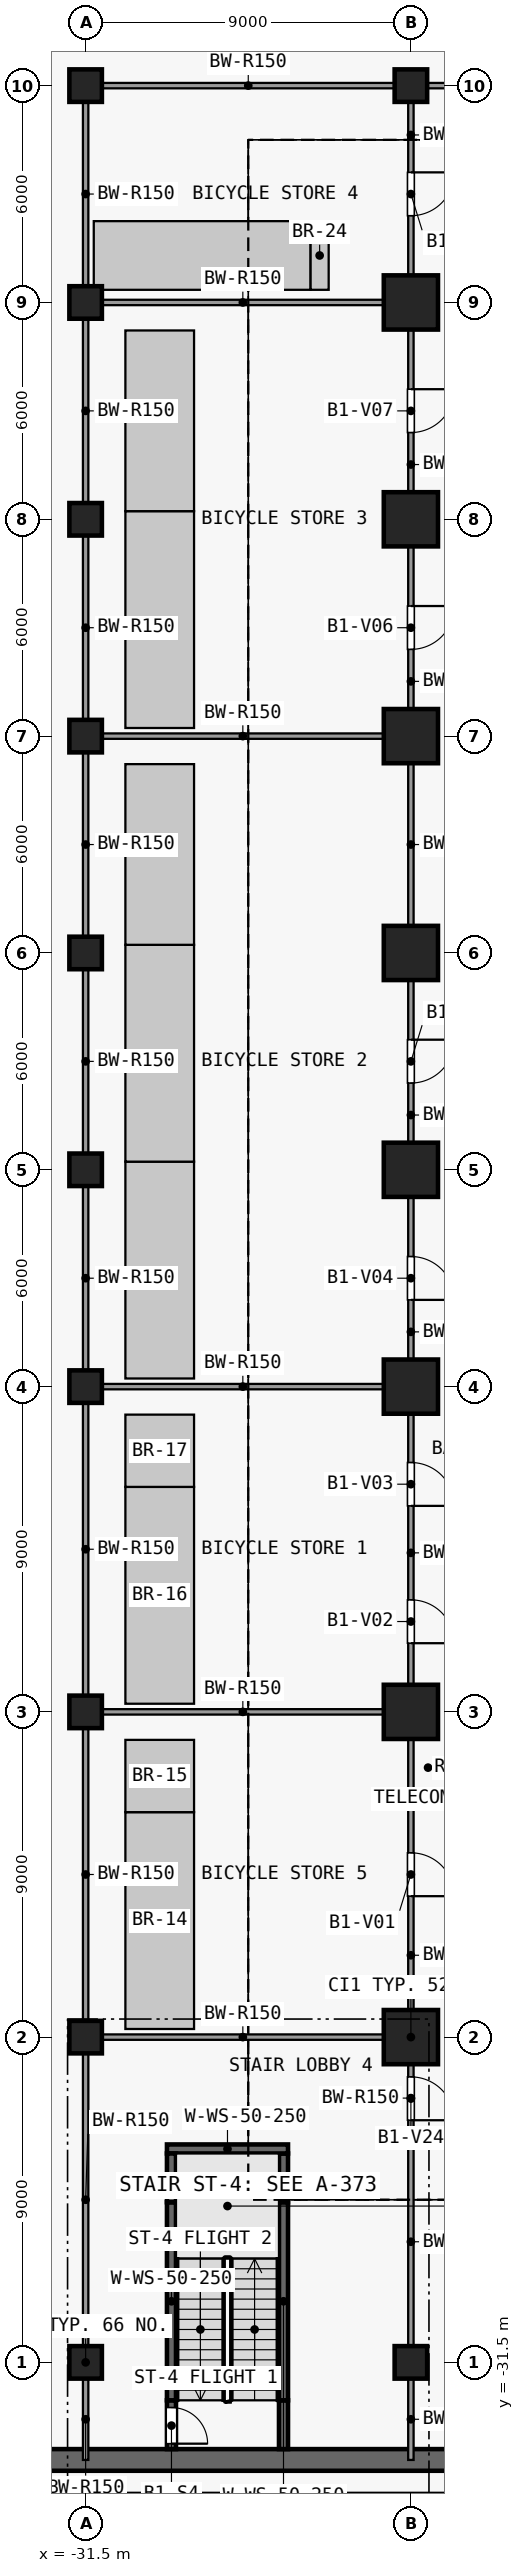
"""IFC4 building model, lengths in metres.
Left out: names, types, materials, properties, quantities, classifications, styles, units other than length and angle.
Written with IfcOpenShell. Run it as: python <this file> out.ifc"""

import sys

from ifc_helpers import new_model, si_unit, direction, frame, frame_2d, origin, origin_2d, place, context, subcontext, project, spatial, rectangle, extrude, element, fill, save


model = new_model("IFC4")
c1 = context("Model", 3, precision=1e-05, world=origin(), true_north=direction((0.0, 1.0)))
c2 = subcontext(c1, "Body", "Model", "MODEL_VIEW")
j1 = project(units=[si_unit("LENGTHUNIT", "METRE"), si_unit("PLANEANGLEUNIT", "RADIAN")], contexts=[c1])
p1 = place(None, origin())
s1 = spatial("IfcSite", under=j1, at=p1, CompositionType="ELEMENT")
p2 = place(p1, origin())
s2 = spatial("IfcBuilding", under=s1, at=p2, CompositionType="ELEMENT")
p3 = place(p2, frame((0.0, 0.0, -5.0)))
s3 = spatial("IfcBuildingStorey", under=s2, at=p3, CompositionType="ELEMENT", Elevation=-5.0)
p4 = place(p3, frame((-34.5, -34.2, 0.0), z_axis=(0.0, 0.0, 1.0), x_axis=(1.0, 0.0, 0.0)))
e1 = element("IfcWall", 1, at=p4, inside=s3, PredefinedType="SOLIDWALL", context=c2, shape_type="SweptSolid", body=[
    extrude(rectangle(XDim=96.0, YDim=0.6, at=frame_2d((48.0, 0.0))), origin(), (0.0, 0.0, 1.0), 4.55),
])
for number, where, z_axis, x_axis in (
    (2, (-31.5, -31.5, 0.0), (0.0, 0.0, 1.0), (1.0, 0.0, 0.0)),
    (3, (-31.5, -22.5, 0.0), (0.0, 0.0, 1.0), (1.0, 0.0, 0.0)),
    (4, (-31.5, -13.5, 0.0), (0.0, 0.0, 1.0), (1.0, 0.0, 0.0)),
    (5, (-31.5, -4.5, 0.0), (0.0, 0.0, 1.0), (1.0, 0.0, 0.0)),
    (6, (-31.5, 1.5, 0.0), (0.0, 0.0, 1.0), (1.0, 0.0, 0.0)),
    (7, (-31.5, 7.5, 0.0), (0.0, 0.0, 1.0), (1.0, 0.0, 0.0)),
    (8, (-31.5, 13.5, 0.0), (0.0, 0.0, 1.0), (1.0, 0.0, 0.0)),
    (9, (-31.5, 19.5, 0.0), (0.0, 0.0, 1.0), (1.0, 0.0, 0.0)),
    (10, (-31.5, 25.5, 0.0), (0.0, 0.0, 1.0), (1.0, 0.0, 0.0)),
    (11, (-31.5, 31.5, 0.0), (0.0, 0.0, 1.0), (1.0, 0.0, 0.0)),
    (12, (-22.5, -31.5, 0.0), (0.0, 0.0, 1.0), (1.0, 0.0, 0.0)),
):
    element("IfcColumn", number, at=place(p3, frame(where, z_axis=z_axis, x_axis=x_axis)), inside=s3, PredefinedType="COLUMN", context=c2, shape_type="SweptSolid", body=[
        extrude(rectangle(XDim=0.9, YDim=0.9, at=origin_2d()), origin(), (0.0, 0.0, 1.0), 5.0),
    ])
for number, where, z_axis, x_axis in (
    (13, (-22.5, -22.5, 0.0), (0.0, 0.0, 1.0), (1.0, 0.0, 0.0)),
    (14, (-22.5, -13.5, 0.0), (0.0, 0.0, 1.0), (1.0, 0.0, 0.0)),
    (15, (-22.5, -4.5, 0.0), (0.0, 0.0, 1.0), (1.0, 0.0, 0.0)),
    (16, (-22.5, 1.5, 0.0), (0.0, 0.0, 1.0), (1.0, 0.0, 0.0)),
    (17, (-22.5, 7.5, 0.0), (0.0, 0.0, 1.0), (1.0, 0.0, 0.0)),
    (18, (-22.5, 13.5, 0.0), (0.0, 0.0, 1.0), (1.0, 0.0, 0.0)),
    (19, (-22.5, 19.5, 0.0), (0.0, 0.0, 1.0), (1.0, 0.0, 0.0)),
    (20, (-22.5, 25.5, 0.0), (0.0, 0.0, 1.0), (1.0, 0.0, 0.0)),
):
    element("IfcColumn", number, at=place(p3, frame(where, z_axis=z_axis, x_axis=x_axis)), inside=s3, PredefinedType="COLUMN", context=c2, shape_type="SweptSolid", body=[
        extrude(rectangle(XDim=1.5, YDim=1.5, at=origin_2d()), origin(), (0.0, 0.0, 1.0), 5.0),
    ])
p5 = place(p3, frame((-22.5, 31.5, 0.0), z_axis=(0.0, 0.0, 1.0), x_axis=(1.0, 0.0, 0.0)))
e21 = element("IfcColumn", 21, at=p5, inside=s3, PredefinedType="COLUMN", context=c2, shape_type="SweptSolid", body=[
    extrude(rectangle(XDim=0.9, YDim=0.9, at=origin_2d()), origin(), (0.0, 0.0, 1.0), 5.0),
])
p6 = place(p3, frame((-22.575, -25.2, 0.0), z_axis=(0.0, 0.0, 1.0), x_axis=(1.0, 0.0, 0.0)))
e22 = element("IfcWall", 22, at=p6, inside=s3, PredefinedType="PARTITIONING", context=c2, shape_type="SweptSolid", body=[
    extrude(rectangle(XDim=6.15, YDim=0.15, at=frame_2d((3.075, 0.0))), origin(), (0.0, 0.0, 1.0), 4.55),
])
for number, where, z_axis, x_axis in (
    (23, (-31.05, -22.5, 0.0), (0.0, 0.0, 1.0), (1.0, 0.0, 0.0)),
    (24, (-31.05, -13.5, 0.0), (0.0, 0.0, 1.0), (1.0, 0.0, 0.0)),
    (25, (-31.05, -4.5, 0.0), (0.0, 0.0, 1.0), (1.0, 0.0, 0.0)),
    (26, (-31.05, 13.5, 0.0), (0.0, 0.0, 1.0), (1.0, 0.0, 0.0)),
    (27, (-31.05, 25.5, 0.0), (0.0, 0.0, 1.0), (1.0, 0.0, 0.0)),
):
    element("IfcWall", number, at=place(p3, frame(where, z_axis=z_axis, x_axis=x_axis)), inside=s3, PredefinedType="PARTITIONING", context=c2, shape_type="SweptSolid", body=[
        extrude(rectangle(XDim=7.8, YDim=0.15, at=frame_2d((3.9, 0.0))), origin(), (0.0, 0.0, 1.0), 4.55),
    ])
p7 = place(p3, frame((-31.05, 31.5, 0.0), z_axis=(0.0, 0.0, 1.0), x_axis=(1.0, 0.0, 0.0)))
e28 = element("IfcWall", 28, at=p7, inside=s3, PredefinedType="PARTITIONING", context=c2, shape_type="SweptSolid", body=[
    extrude(rectangle(XDim=8.1, YDim=0.15, at=frame_2d((4.05, 0.0))), origin(), (0.0, 0.0, 1.0), 4.55),
])
p8 = place(p3, frame((-22.05, 31.5, 0.0), z_axis=(0.0, 0.0, 1.0), x_axis=(1.0, 0.0, 0.0)))
e29 = element("IfcWall", 29, at=p8, inside=s3, PredefinedType="PARTITIONING", context=c2, shape_type="SweptSolid", body=[
    extrude(rectangle(XDim=5.1, YDim=0.15, at=frame_2d((2.55, 0.0))), origin(), (0.0, 0.0, 1.0), 4.55),
])
p9 = place(p3, frame((-31.5, -34.2, 0.0), z_axis=(0.0, 0.0, 1.0), x_axis=(0.0, 1.0, 0.0)))
e30 = element("IfcWall", 30, at=p9, inside=s3, PredefinedType="PARTITIONING", context=c2, shape_type="SweptSolid", body=[
    extrude(rectangle(XDim=2.25, YDim=0.15, at=frame_2d((1.125, 0.0))), origin(), (0.0, 0.0, 1.0), 4.55),
])
for number, where, z_axis, x_axis in (
    (31, (-31.5, -31.05, 0.0), (0.0, 0.0, 1.0), (0.0, 1.0, 0.0)),
    (32, (-31.5, -22.05, 0.0), (0.0, 0.0, 1.0), (0.0, 1.0, 0.0)),
    (33, (-31.5, -13.05, 0.0), (0.0, 0.0, 1.0), (0.0, 1.0, 0.0)),
):
    element("IfcWall", number, at=place(p3, frame(where, z_axis=z_axis, x_axis=x_axis)), inside=s3, PredefinedType="PARTITIONING", context=c2, shape_type="SweptSolid", body=[
        extrude(rectangle(XDim=8.1, YDim=0.15, at=frame_2d((4.05, 0.0))), origin(), (0.0, 0.0, 1.0), 4.55),
    ])
for number, where, z_axis, x_axis in (
    (34, (-31.5, -4.05, 0.0), (0.0, 0.0, 1.0), (0.0, 1.0, 0.0)),
    (35, (-31.5, 1.95, 0.0), (0.0, 0.0, 1.0), (0.0, 1.0, 0.0)),
    (36, (-31.5, 7.95, 0.0), (0.0, 0.0, 1.0), (0.0, 1.0, 0.0)),
    (37, (-31.5, 13.95, 0.0), (0.0, 0.0, 1.0), (0.0, 1.0, 0.0)),
    (38, (-31.5, 19.95, 0.0), (0.0, 0.0, 1.0), (0.0, 1.0, 0.0)),
    (39, (-31.5, 25.95, 0.0), (0.0, 0.0, 1.0), (0.0, 1.0, 0.0)),
):
    element("IfcWall", number, at=place(p3, frame(where, z_axis=z_axis, x_axis=x_axis)), inside=s3, PredefinedType="PARTITIONING", context=c2, shape_type="SweptSolid", body=[
        extrude(rectangle(XDim=5.1, YDim=0.15, at=frame_2d((2.55, 0.0))), origin(), (0.0, 0.0, 1.0), 4.55),
    ])
p10 = place(p3, frame((-22.5, -34.2, 0.0), z_axis=(0.0, 0.0, 1.0), x_axis=(0.0, 1.0, 0.0)))
e40 = element("IfcWall", 40, at=p10, inside=s3, PredefinedType="PARTITIONING", context=c2, shape_type="SweptSolid", body=[
    extrude(rectangle(XDim=2.25, YDim=0.15, at=frame_2d((1.125, 0.0))), origin(), (0.0, 0.0, 1.0), 4.55),
])
p11 = place(p3, frame((-22.5, -31.05, 0.0), z_axis=(0.0, 0.0, 1.0), x_axis=(0.0, 1.0, 0.0)))
e41 = element("IfcWall", 41, at=p11, inside=s3, PredefinedType="PARTITIONING", context=c2, shape_type="SweptSolid", body=[
    extrude(rectangle(XDim=5.775, YDim=0.15, at=frame_2d((2.888, 0.0))), origin(), (0.0, 0.0, 1.0), 4.55),
])
p12 = place(p3, frame((-22.5, -23.25, 0.0), z_axis=(0.0, 0.0, 1.0), x_axis=(0.0, -1.0, 0.0)))
e42 = element("IfcWall", 42, at=p12, inside=s3, PredefinedType="PARTITIONING", context=c2, shape_type="SweptSolid", body=[
    extrude(rectangle(XDim=1.875, YDim=0.15, at=frame_2d((0.938, 0.0))), origin(), (0.0, 0.0, 1.0), 4.55),
])
p13 = place(p12, frame((0.35, 0.0, 0.0)))
e43 = element("IfcOpeningElement", 43, at=p13, cuts=e42, PredefinedType="OPENING", context=c2, shape_type="SweptSolid", body=[
    extrude(rectangle(XDim=1.2, YDim=2.1, at=frame_2d((0.6, 1.05))), frame((0.0, 0.085, 0.0), z_axis=(0.0, -1.0, 0.0), x_axis=(1.0, 0.0, 0.0)), (0.0, 0.0, 1.0), 0.17),
])
p14 = place(p3, frame((-22.5, -14.25, 0.0), z_axis=(0.0, 0.0, 1.0), x_axis=(0.0, -1.0, 0.0)))
e44 = element("IfcWall", 44, at=p14, inside=s3, PredefinedType="PARTITIONING", context=c2, shape_type="SweptSolid", body=[
    extrude(rectangle(XDim=7.5, YDim=0.15, at=frame_2d((3.75, 0.0))), origin(), (0.0, 0.0, 1.0), 4.55),
])
p15 = place(p14, frame((3.15, 0.0, 0.0)))
e45 = element("IfcOpeningElement", 45, at=p15, cuts=e44, PredefinedType="OPENING", context=c2, shape_type="SweptSolid", body=[
    extrude(rectangle(XDim=1.2, YDim=2.1, at=frame_2d((0.6, 1.05))), frame((0.0, 0.085, 0.0), z_axis=(0.0, -1.0, 0.0), x_axis=(1.0, 0.0, 0.0)), (0.0, 0.0, 1.0), 0.17),
])
p16 = place(p3, frame((-22.5, -5.25, 0.0), z_axis=(0.0, 0.0, 1.0), x_axis=(0.0, -1.0, 0.0)))
e46 = element("IfcWall", 46, at=p16, inside=s3, PredefinedType="PARTITIONING", context=c2, shape_type="SweptSolid", body=[
    extrude(rectangle(XDim=7.5, YDim=0.15, at=frame_2d((3.75, 0.0))), origin(), (0.0, 0.0, 1.0), 4.55),
])
p17 = place(p16, frame((5.15, 0.0, 0.0)))
e47 = element("IfcOpeningElement", 47, at=p17, cuts=e46, PredefinedType="OPENING", context=c2, shape_type="SweptSolid", body=[
    extrude(rectangle(XDim=1.2, YDim=2.1, at=frame_2d((0.6, 1.05))), frame((0.0, 0.085, 0.0), z_axis=(0.0, -1.0, 0.0), x_axis=(1.0, 0.0, 0.0)), (0.0, 0.0, 1.0), 0.17),
])
p18 = place(p16, frame((1.35, 0.0, 0.0)))
e48 = element("IfcOpeningElement", 48, at=p18, cuts=e46, PredefinedType="OPENING", context=c2, shape_type="SweptSolid", body=[
    extrude(rectangle(XDim=1.2, YDim=2.1, at=frame_2d((0.6, 1.05))), frame((0.0, 0.085, 0.0), z_axis=(0.0, -1.0, 0.0), x_axis=(1.0, 0.0, 0.0)), (0.0, 0.0, 1.0), 0.17),
])
p19 = place(p3, frame((-22.5, 0.75, 0.0), z_axis=(0.0, 0.0, 1.0), x_axis=(0.0, -1.0, 0.0)))
e49 = element("IfcWall", 49, at=p19, inside=s3, PredefinedType="PARTITIONING", context=c2, shape_type="SweptSolid", body=[
    extrude(rectangle(XDim=4.5, YDim=0.15, at=frame_2d((2.25, 0.0))), origin(), (0.0, 0.0, 1.0), 4.55),
])
p20 = place(p19, frame((1.65, 0.0, 0.0)))
e50 = element("IfcOpeningElement", 50, at=p20, cuts=e49, PredefinedType="OPENING", context=c2, shape_type="SweptSolid", body=[
    extrude(rectangle(XDim=1.2, YDim=2.1, at=frame_2d((0.6, 1.05))), frame((0.0, 0.085, 0.0), z_axis=(0.0, -1.0, 0.0), x_axis=(1.0, 0.0, 0.0)), (0.0, 0.0, 1.0), 0.17),
])
p21 = place(p3, frame((-22.5, 6.75, 0.0), z_axis=(0.0, 0.0, 1.0), x_axis=(0.0, -1.0, 0.0)))
e51 = element("IfcWall", 51, at=p21, inside=s3, PredefinedType="PARTITIONING", context=c2, shape_type="SweptSolid", body=[
    extrude(rectangle(XDim=4.5, YDim=0.15, at=frame_2d((2.25, 0.0))), origin(), (0.0, 0.0, 1.0), 4.55),
])
p22 = place(p21, frame((1.65, 0.0, 0.0)))
e52 = element("IfcOpeningElement", 52, at=p22, cuts=e51, PredefinedType="OPENING", context=c2, shape_type="SweptSolid", body=[
    extrude(rectangle(XDim=1.2, YDim=2.1, at=frame_2d((0.6, 1.05))), frame((0.0, 0.085, 0.0), z_axis=(0.0, -1.0, 0.0), x_axis=(1.0, 0.0, 0.0)), (0.0, 0.0, 1.0), 0.17),
])
p23 = place(p3, frame((-22.5, 8.25, 0.0), z_axis=(0.0, 0.0, 1.0), x_axis=(0.0, 1.0, 0.0)))
e53 = element("IfcWall", 53, at=p23, inside=s3, PredefinedType="PARTITIONING", context=c2, shape_type="SweptSolid", body=[
    extrude(rectangle(XDim=4.5, YDim=0.15, at=frame_2d((2.25, 0.0))), origin(), (0.0, 0.0, 1.0), 4.55),
])
p24 = place(p3, frame((-22.5, 18.75, 0.0), z_axis=(0.0, 0.0, 1.0), x_axis=(0.0, -1.0, 0.0)))
e54 = element("IfcWall", 54, at=p24, inside=s3, PredefinedType="PARTITIONING", context=c2, shape_type="SweptSolid", body=[
    extrude(rectangle(XDim=4.5, YDim=0.15, at=frame_2d((2.25, 0.0))), origin(), (0.0, 0.0, 1.0), 4.55),
])
p25 = place(p24, frame((1.65, 0.0, 0.0)))
e55 = element("IfcOpeningElement", 55, at=p25, cuts=e54, PredefinedType="OPENING", context=c2, shape_type="SweptSolid", body=[
    extrude(rectangle(XDim=1.2, YDim=2.1, at=frame_2d((0.6, 1.05))), frame((0.0, 0.085, 0.0), z_axis=(0.0, -1.0, 0.0), x_axis=(1.0, 0.0, 0.0)), (0.0, 0.0, 1.0), 0.17),
])
p26 = place(p3, frame((-22.5, 24.75, 0.0), z_axis=(0.0, 0.0, 1.0), x_axis=(0.0, -1.0, 0.0)))
e56 = element("IfcWall", 56, at=p26, inside=s3, PredefinedType="PARTITIONING", context=c2, shape_type="SweptSolid", body=[
    extrude(rectangle(XDim=4.5, YDim=0.15, at=frame_2d((2.25, 0.0))), origin(), (0.0, 0.0, 1.0), 4.55),
])
p27 = place(p26, frame((1.65, 0.0, 0.0)))
e57 = element("IfcOpeningElement", 57, at=p27, cuts=e56, PredefinedType="OPENING", context=c2, shape_type="SweptSolid", body=[
    extrude(rectangle(XDim=1.2, YDim=2.1, at=frame_2d((0.6, 1.05))), frame((0.0, 0.085, 0.0), z_axis=(0.0, -1.0, 0.0), x_axis=(1.0, 0.0, 0.0)), (0.0, 0.0, 1.0), 0.17),
])
p28 = place(p3, frame((-22.5, 31.05, 0.0), z_axis=(0.0, 0.0, 1.0), x_axis=(0.0, -1.0, 0.0)))
e58 = element("IfcWall", 58, at=p28, inside=s3, PredefinedType="PARTITIONING", context=c2, shape_type="SweptSolid", body=[
    extrude(rectangle(XDim=4.8, YDim=0.15, at=frame_2d((2.4, 0.0))), origin(), (0.0, 0.0, 1.0), 4.55),
])
p29 = place(p28, frame((1.95, 0.0, 0.0)))
e59 = element("IfcOpeningElement", 59, at=p29, cuts=e58, PredefinedType="OPENING", context=c2, shape_type="SweptSolid", body=[
    extrude(rectangle(XDim=1.2, YDim=2.1, at=frame_2d((0.6, 1.05))), frame((0.0, 0.085, 0.0), z_axis=(0.0, -1.0, 0.0), x_axis=(1.0, 0.0, 0.0)), (0.0, 0.0, 1.0), 0.17),
])
p30 = place(p3, frame((-29.125, -32.55, 0.0), z_axis=(0.0, 0.0, 1.0), x_axis=(0.0, -1.0, 0.0)))
e60 = element("IfcWall", 60, at=p30, inside=s3, PredefinedType="SHEAR", context=c2, shape_type="SweptSolid", body=[
    extrude(rectangle(XDim=1.35, YDim=0.25, at=frame_2d((0.675, 0.0))), origin(), (0.0, 0.0, 1.0), 4.55),
])
p31 = place(p30, frame((0.2, 0.0, 0.0)))
e61 = element("IfcOpeningElement", 61, at=p31, cuts=e60, PredefinedType="OPENING", context=c2, shape_type="SweptSolid", body=[
    extrude(rectangle(XDim=1.0, YDim=2.1, at=frame_2d((0.5, 1.05))), frame((0.0, 0.135, 0.0), z_axis=(0.0, -1.0, 0.0), x_axis=(1.0, 0.0, 0.0)), (0.0, 0.0, 1.0), 0.27),
])
p32 = place(p3, frame((-29.125, -32.55, 0.0), z_axis=(0.0, 0.0, 1.0), x_axis=(0.0, 1.0, 0.0)))
e62 = element("IfcWall", 62, at=p32, inside=s3, PredefinedType="SHEAR", context=c2, shape_type="SweptSolid", body=[
    extrude(rectangle(XDim=5.48, YDim=0.25, at=frame_2d((2.74, 0.0))), origin(), (0.0, 0.0, 1.0), 4.55),
])
p33 = place(p3, frame((-29.125, -27.07, 0.0), z_axis=(0.0, 0.0, 1.0), x_axis=(0.0, 1.0, 0.0)))
e63 = element("IfcWall", 63, at=p33, inside=s3, PredefinedType="SHEAR", context=c2, shape_type="SweptSolid", body=[
    extrude(rectangle(XDim=1.35, YDim=0.25, at=frame_2d((0.675, 0.0))), origin(), (0.0, 0.0, 1.0), 4.55),
])
p34 = place(p3, frame((-26.025, -33.9, 0.0), z_axis=(0.0, 0.0, 1.0), x_axis=(0.0, 1.0, 0.0)))
e64 = element("IfcWall", 64, at=p34, inside=s3, PredefinedType="SHEAR", context=c2, shape_type="SweptSolid", body=[
    extrude(rectangle(XDim=1.35, YDim=0.25, at=frame_2d((0.675, 0.0))), origin(), (0.0, 0.0, 1.0), 4.55),
])
p35 = place(p3, frame((-26.025, -32.55, 0.0), z_axis=(0.0, 0.0, 1.0), x_axis=(0.0, 1.0, 0.0)))
e65 = element("IfcWall", 65, at=p35, inside=s3, PredefinedType="SHEAR", context=c2, shape_type="SweptSolid", body=[
    extrude(rectangle(XDim=5.48, YDim=0.25, at=frame_2d((2.74, 0.0))), origin(), (0.0, 0.0, 1.0), 4.55),
])
p36 = place(p3, frame((-26.025, -27.07, 0.0), z_axis=(0.0, 0.0, 1.0), x_axis=(0.0, 1.0, 0.0)))
e66 = element("IfcWall", 66, at=p36, inside=s3, PredefinedType="SHEAR", context=c2, shape_type="SweptSolid", body=[
    extrude(rectangle(XDim=1.35, YDim=0.25, at=frame_2d((0.675, 0.0))), origin(), (0.0, 0.0, 1.0), 4.55),
])
p37 = place(p3, frame((-29.25, -25.595, 0.0), z_axis=(0.0, 0.0, 1.0), x_axis=(1.0, 0.0, 0.0)))
e67 = element("IfcWall", 67, at=p37, inside=s3, PredefinedType="SHEAR", context=c2, shape_type="SweptSolid", body=[
    extrude(rectangle(XDim=3.35, YDim=0.25, at=frame_2d((1.675, 0.0))), origin(), (0.0, 0.0, 1.0), 4.55),
])
p38 = place(p15, origin())
e68 = element("IfcDoor", 68, at=p38, inside=s3, OperationType="SINGLE_SWING_RIGHT", PredefinedType="DOOR", context=c2, shape_type="SweptSolid", body=[
    extrude(rectangle(XDim=1.2, YDim=2.1, at=frame_2d((0.6, 1.05))), frame((0.0, 0.025, 0.0), z_axis=(0.0, -1.0, 0.0), x_axis=(1.0, 0.0, 0.0)), (0.0, 0.0, 1.0), 0.05),
])
fill(e45, e68)
p39 = place(p17, origin())
e69 = element("IfcDoor", 69, at=p39, inside=s3, OperationType="SINGLE_SWING_RIGHT", PredefinedType="DOOR", context=c2, shape_type="SweptSolid", body=[
    extrude(rectangle(XDim=1.2, YDim=2.1, at=frame_2d((0.6, 1.05))), frame((0.0, 0.025, 0.0), z_axis=(0.0, -1.0, 0.0), x_axis=(1.0, 0.0, 0.0)), (0.0, 0.0, 1.0), 0.05),
])
fill(e47, e69)
p40 = place(p18, origin())
e70 = element("IfcDoor", 70, at=p40, inside=s3, OperationType="SINGLE_SWING_RIGHT", PredefinedType="DOOR", context=c2, shape_type="SweptSolid", body=[
    extrude(rectangle(XDim=1.2, YDim=2.1, at=frame_2d((0.6, 1.05))), frame((0.0, 0.025, 0.0), z_axis=(0.0, -1.0, 0.0), x_axis=(1.0, 0.0, 0.0)), (0.0, 0.0, 1.0), 0.05),
])
fill(e48, e70)
p41 = place(p20, origin())
e71 = element("IfcDoor", 71, at=p41, inside=s3, OperationType="SINGLE_SWING_RIGHT", PredefinedType="DOOR", context=c2, shape_type="SweptSolid", body=[
    extrude(rectangle(XDim=1.2, YDim=2.1, at=frame_2d((0.6, 1.05))), frame((0.0, 0.025, 0.0), z_axis=(0.0, -1.0, 0.0), x_axis=(1.0, 0.0, 0.0)), (0.0, 0.0, 1.0), 0.05),
])
fill(e50, e71)
p42 = place(p22, origin())
e72 = element("IfcDoor", 72, at=p42, inside=s3, OperationType="SINGLE_SWING_LEFT", PredefinedType="DOOR", context=c2, shape_type="SweptSolid", body=[
    extrude(rectangle(XDim=1.2, YDim=2.1, at=frame_2d((0.6, 1.05))), frame((0.0, 0.025, 0.0), z_axis=(0.0, -1.0, 0.0), x_axis=(1.0, 0.0, 0.0)), (0.0, 0.0, 1.0), 0.05),
])
fill(e52, e72)
p43 = place(p25, origin())
e73 = element("IfcDoor", 73, at=p43, inside=s3, OperationType="SINGLE_SWING_LEFT", PredefinedType="DOOR", context=c2, shape_type="SweptSolid", body=[
    extrude(rectangle(XDim=1.2, YDim=2.1, at=frame_2d((0.6, 1.05))), frame((0.0, 0.025, 0.0), z_axis=(0.0, -1.0, 0.0), x_axis=(1.0, 0.0, 0.0)), (0.0, 0.0, 1.0), 0.05),
])
fill(e55, e73)
p44 = place(p27, origin())
e74 = element("IfcDoor", 74, at=p44, inside=s3, OperationType="SINGLE_SWING_LEFT", PredefinedType="DOOR", context=c2, shape_type="SweptSolid", body=[
    extrude(rectangle(XDim=1.2, YDim=2.1, at=frame_2d((0.6, 1.05))), frame((0.0, 0.025, 0.0), z_axis=(0.0, -1.0, 0.0), x_axis=(1.0, 0.0, 0.0)), (0.0, 0.0, 1.0), 0.05),
])
fill(e57, e74)
p45 = place(p29, origin())
e75 = element("IfcDoor", 75, at=p45, inside=s3, OperationType="SINGLE_SWING_LEFT", PredefinedType="DOOR", context=c2, shape_type="SweptSolid", body=[
    extrude(rectangle(XDim=1.2, YDim=2.1, at=frame_2d((0.6, 1.05))), frame((0.0, 0.025, 0.0), z_axis=(0.0, -1.0, 0.0), x_axis=(1.0, 0.0, 0.0)), (0.0, 0.0, 1.0), 0.05),
])
fill(e59, e75)
p46 = place(p13, origin())
e76 = element("IfcDoor", 76, at=p46, inside=s3, OperationType="SINGLE_SWING_RIGHT", PredefinedType="DOOR", context=c2, shape_type="SweptSolid", body=[
    extrude(rectangle(XDim=1.2, YDim=2.1, at=frame_2d((0.6, 1.05))), frame((0.0, 0.025, 0.0), z_axis=(0.0, -1.0, 0.0), x_axis=(1.0, 0.0, 0.0)), (0.0, 0.0, 1.0), 0.05),
])
fill(e43, e76)
p47 = place(p31, origin())
e77 = element("IfcDoor", 77, at=p47, inside=s3, OperationType="SINGLE_SWING_RIGHT", PredefinedType="DOOR", context=c2, shape_type="SweptSolid", body=[
    extrude(rectangle(XDim=1.0, YDim=2.1, at=frame_2d((0.5, 1.05))), frame((0.0, 0.025, 0.0), z_axis=(0.0, -1.0, 0.0), x_axis=(1.0, 0.0, 0.0)), (0.0, 0.0, 1.0), 0.05),
])
fill(e61, e77)
save(model, sys.argv[1])
